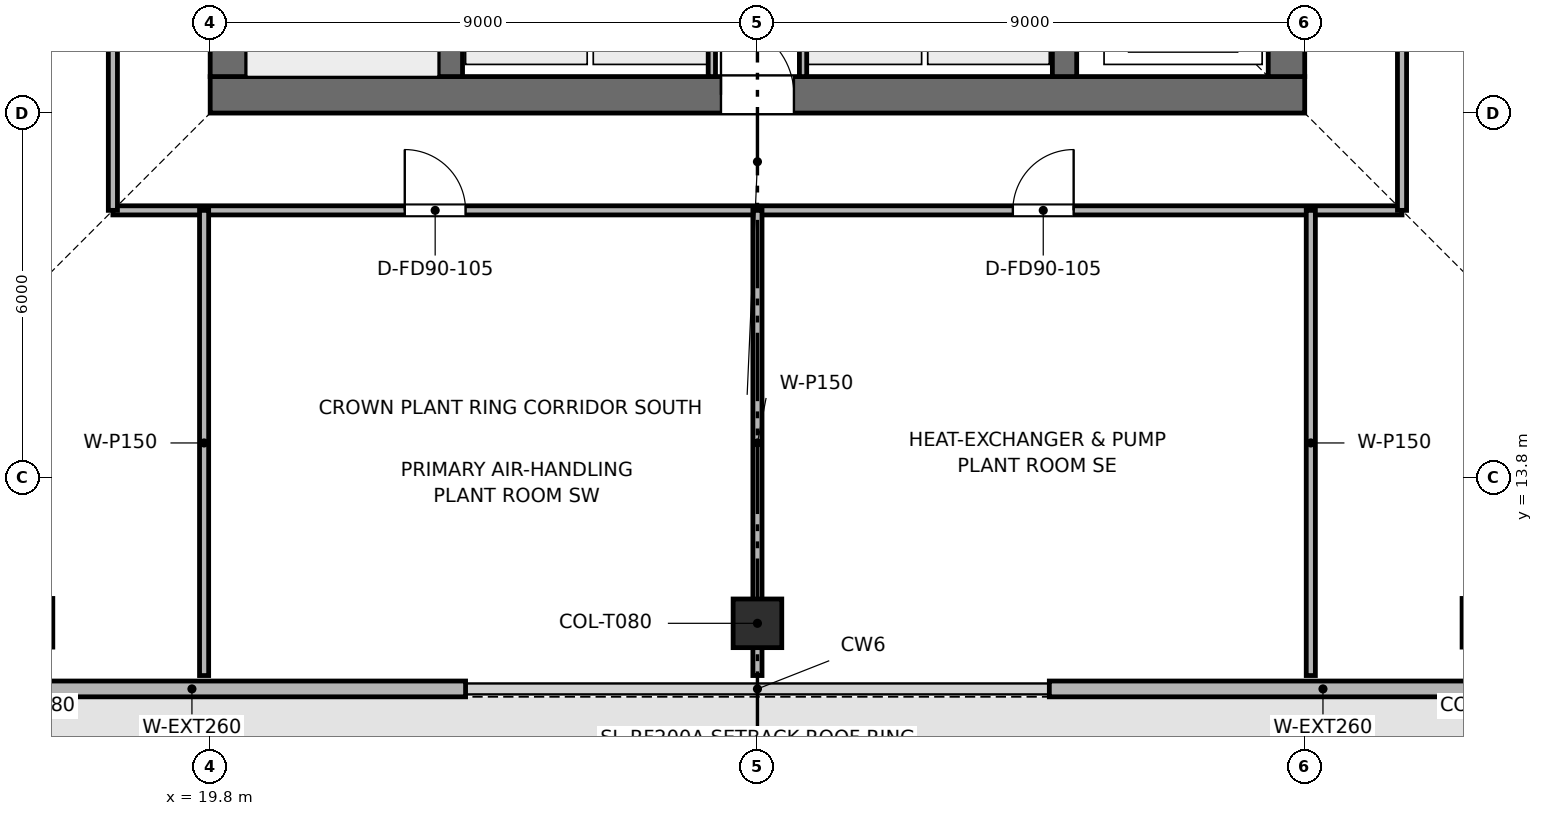
"""IFC4 building model, lengths in metres.
Left out: names, types, materials, properties, quantities, classifications, styles, units other than length and angle.
Written with IfcOpenShell. Run it as: python <this file> out.ifc"""

import sys

from ifc_helpers import new_model, si_unit, direction, frame, frame_2d, origin, origin_2d, place, context, subcontext, project, spatial, rectangle, extrude, element, fill, save


model = new_model("IFC4")
c1 = context("Model", 3, precision=1e-05, world=origin(), true_north=direction((0.0, 1.0)))
c2 = subcontext(c1, "Body", "Model", "MODEL_VIEW")
j1 = project(units=[si_unit("LENGTHUNIT", "METRE"), si_unit("PLANEANGLEUNIT", "RADIAN")], contexts=[c1])
p1 = place(None, origin())
s1 = spatial("IfcSite", under=j1, at=p1, CompositionType="ELEMENT")
p2 = place(p1, origin())
s2 = spatial("IfcBuilding", under=s1, at=p2, CompositionType="ELEMENT")
p3 = place(p2, frame((0.0, 0.0, 369.0)))
s3 = spatial("IfcBuildingStorey", under=s2, at=p3, CompositionType="ELEMENT", Elevation=369.0)
p4 = place(p3, frame((19.8, 20.1, 0.0), z_axis=(0.0, 0.0, 1.0), x_axis=(1.0, 0.0, 0.0)))
e1 = element("IfcWall", 1, at=p4, inside=s3, PredefinedType="SHEAR", context=c2, shape_type="SweptSolid", body=[
    extrude(rectangle(XDim=18.0, YDim=0.6, at=frame_2d((9.0, 0.0))), origin(), (0.0, 0.0, 1.0), 4.8),
])
p5 = place(p4, frame((8.4, 0.0, 0.0)))
e2 = element("IfcOpeningElement", 2, at=p5, cuts=e1, PredefinedType="OPENING", context=c2, shape_type="SweptSolid", body=[
    extrude(rectangle(XDim=1.2, YDim=2.2, at=frame_2d((0.6, 1.1))), frame((0.0, 0.31, 0.0), z_axis=(0.0, -1.0, 0.0), x_axis=(1.0, 0.0, 0.0)), (0.0, 0.0, 1.0), 0.62),
])
p6 = place(p3, frame((20.1, 20.4, 0.0), z_axis=(0.0, 0.0, 1.0), x_axis=(0.0, 1.0, 0.0)))
e3 = element("IfcWall", 3, at=p6, inside=s3, PredefinedType="SHEAR", context=c2, shape_type="SweptSolid", body=[
    extrude(rectangle(XDim=16.8, YDim=0.6, at=frame_2d((8.4, 0.0))), origin(), (0.0, 0.0, 1.0), 4.8),
])
p7 = place(p6, frame((10.4, 0.0, 0.0)))
e4 = element("IfcOpeningElement", 4, at=p7, cuts=e3, PredefinedType="OPENING", context=c2, shape_type="SweptSolid", body=[
    extrude(rectangle(XDim=1.1, YDim=2.15, at=frame_2d((0.55, 1.075))), frame((0.0, 0.31, 0.0), z_axis=(0.0, -1.0, 0.0), x_axis=(1.0, 0.0, 0.0)), (0.0, 0.0, 1.0), 0.62),
])
p8 = place(p3, frame((37.5, 20.4, 0.0), z_axis=(0.0, 0.0, 1.0), x_axis=(0.0, 1.0, 0.0)))
e5 = element("IfcWall", 5, at=p8, inside=s3, PredefinedType="SHEAR", context=c2, shape_type="SweptSolid", body=[
    extrude(rectangle(XDim=16.8, YDim=0.6, at=frame_2d((8.4, 0.0))), origin(), (0.0, 0.0, 1.0), 4.8),
])
p9 = place(p8, frame((4.9, 0.0, 0.0)))
e6 = element("IfcOpeningElement", 6, at=p9, cuts=e5, PredefinedType="OPENING", context=c2, shape_type="SweptSolid", body=[
    extrude(rectangle(XDim=1.1, YDim=2.15, at=frame_2d((0.55, 1.075))), frame((0.0, 0.31, 0.0), z_axis=(0.0, -1.0, 0.0), x_axis=(1.0, 0.0, 0.0)), (0.0, 0.0, 1.0), 0.62),
])
for number, where, z_axis, x_axis in (
    (7, (23.75, 20.4, 0.0), (0.0, 0.0, 1.0), (0.0, 1.0, 0.0)),
    (8, (33.85, 20.4, 0.0), (0.0, 0.0, 1.0), (0.0, 1.0, 0.0)),
):
    element("IfcWall", number, at=place(p3, frame(where, z_axis=z_axis, x_axis=x_axis)), inside=s3, PredefinedType="SHEAR", context=c2, shape_type="SweptSolid", body=[
        extrude(rectangle(XDim=16.8, YDim=0.4, at=frame_2d((8.4, 0.0))), origin(), (0.0, 0.0, 1.0), 4.8),
    ])
p10 = place(p3, frame((16.812, 11.418, 0.049), z_axis=(0.227948550451, 0.341973056736, 0.911643508623), x_axis=(-0.832087899219, 0.554643784761, 0.0)))
e9 = element("IfcColumn", 9, at=p10, inside=s3, PredefinedType="COLUMN", context=c2, shape_type="SweptSolid", body=[
    extrude(rectangle(XDim=0.8, YDim=0.8, at=origin_2d()), origin(), (0.0, 0.0, 1.0), 4.86),
])
p11 = place(p3, frame((28.8, 11.409, 0.025), z_axis=(0.0, 0.35111223817, 0.936333378774), x_axis=(-1.0, 0.0, 0.0)))
e10 = element("IfcColumn", 10, at=p11, inside=s3, PredefinedType="COLUMN", context=c2, shape_type="SweptSolid", body=[
    extrude(rectangle(XDim=0.8, YDim=0.8, at=origin_2d()), origin(), (0.0, 0.0, 1.0), 4.776),
])
p12 = place(p3, frame((40.788, 11.418, 0.049), z_axis=(-0.22799617066, 0.341969140747, 0.911633069245), x_axis=(-0.832031491738, -0.554728399089, 0.0)))
e11 = element("IfcColumn", 11, at=p12, inside=s3, PredefinedType="COLUMN", context=c2, shape_type="SweptSolid", body=[
    extrude(rectangle(XDim=0.8, YDim=0.8, at=origin_2d()), origin(), (0.0, 0.0, 1.0), 4.86),
])
for number, where, z_axis, x_axis in (
    (12, (16.354, 16.354, 0.018), (0.236, 0.236, 0.943), (-0.707, 0.707, 0.0)),
    (13, (41.246, 16.354, 0.018), (-0.236, 0.236, 0.943), (-0.707, -0.707, 0.0)),
):
    element("IfcColumn", number, at=place(p3, frame(where, z_axis=z_axis, x_axis=x_axis)), inside=s3, PredefinedType="COLUMN", context=c2, shape_type="SweptSolid", body=[
        extrude(rectangle(XDim=0.8, YDim=0.8, at=origin_2d()), origin(), (0.0, 0.0, 1.0), 4.751),
    ])
for number, where, z_axis, x_axis in (
    (14, (42.6, 10.33, 0.0), (0.0, 0.0, 1.0), (-1.0, 0.0, 0.0)),
    (15, (24.0, 10.33, 0.0), (0.0, 0.0, 1.0), (-1.0, 0.0, 0.0)),
):
    element("IfcWall", number, at=place(p3, frame(where, z_axis=z_axis, x_axis=x_axis)), inside=s3, PredefinedType="SOLIDWALL", context=c2, shape_type="SweptSolid", body=[
        extrude(rectangle(XDim=9.0, YDim=0.26, at=frame_2d((4.5, 0.0))), origin(), (0.0, 0.0, 1.0), 4.5),
    ])
for number, where, z_axis, x_axis in (
    (16, (28.05, 20.4, 0.0), (0.0, 0.0, 1.0), (0.0, 1.0, 0.0)),
    (17, (29.55, 20.4, 0.0), (0.0, 0.0, 1.0), (0.0, 1.0, 0.0)),
):
    element("IfcWall", number, at=place(p3, frame(where, z_axis=z_axis, x_axis=x_axis)), inside=s3, PredefinedType="PARTITIONING", context=c2, shape_type="SweptSolid", body=[
        extrude(rectangle(XDim=2.75, YDim=0.12, at=frame_2d((1.375, 0.0))), origin(), (0.0, 0.0, 1.0), 4.5),
    ])
p13 = place(p3, frame((18.2, 18.2, 0.0), z_axis=(0.0, 0.0, 1.0), x_axis=(1.0, 0.0, 0.0)))
e18 = element("IfcWall", 18, at=p13, inside=s3, PredefinedType="PARTITIONING", context=c2, shape_type="SweptSolid", body=[
    extrude(rectangle(XDim=21.2, YDim=0.15, at=frame_2d((10.6, 0.0))), origin(), (0.0, 0.0, 1.0), 4.085),
])
p14 = place(p13, frame((4.8, 0.0, 0.0)))
e19 = element("IfcOpeningElement", 19, at=p14, cuts=e18, PredefinedType="OPENING", context=c2, shape_type="SweptSolid", body=[
    extrude(rectangle(XDim=1.0, YDim=2.15, at=frame_2d((0.5, 1.075))), frame((0.0, 0.085, 0.0), z_axis=(0.0, -1.0, 0.0), x_axis=(1.0, 0.0, 0.0)), (0.0, 0.0, 1.0), 0.17),
])
p15 = place(p13, frame((14.8, 0.0, 0.0)))
e20 = element("IfcOpeningElement", 20, at=p15, cuts=e18, PredefinedType="OPENING", context=c2, shape_type="SweptSolid", body=[
    extrude(rectangle(XDim=1.0, YDim=2.15, at=frame_2d((0.5, 1.075))), frame((0.0, 0.085, 0.0), z_axis=(0.0, -1.0, 0.0), x_axis=(1.0, 0.0, 0.0)), (0.0, 0.0, 1.0), 0.17),
])
for number, where, z_axis, x_axis in (
    (21, (18.2, 18.2, 0.0), (0.0, 0.0, 1.0), (0.0, 1.0, 0.0)),
    (22, (39.4, 18.2, 0.0), (0.0, 0.0, 1.0), (0.0, 1.0, 0.0)),
):
    element("IfcWall", number, at=place(p3, frame(where, z_axis=z_axis, x_axis=x_axis)), inside=s3, PredefinedType="PARTITIONING", context=c2, shape_type="SweptSolid", body=[
        extrude(rectangle(XDim=21.2, YDim=0.15, at=frame_2d((10.6, 0.0))), origin(), (0.0, 0.0, 1.0), 4.085),
    ])
p16 = place(p3, frame((19.7, 10.55, 0.0), z_axis=(0.0, 0.0, 1.0), x_axis=(0.0, 1.0, 0.0)))
e23 = element("IfcWall", 23, at=p16, inside=s3, PredefinedType="PARTITIONING", context=c2, shape_type="SweptSolid", body=[
    extrude(rectangle(XDim=7.65, YDim=0.15, at=frame_2d((3.825, 0.0))), origin(), (0.0, 0.0, 1.0), 4.185),
])
p17 = place(p3, frame((28.8, 10.55, 0.0), z_axis=(0.0, 0.0, 1.0), x_axis=(0.0, 1.0, 0.0)))
e24 = element("IfcWall", 24, at=p17, inside=s3, PredefinedType="PARTITIONING", context=c2, shape_type="SweptSolid", body=[
    extrude(rectangle(XDim=7.65, YDim=0.15, at=frame_2d((3.825, 0.0))), origin(), (0.0, 0.0, 1.0), 4.085),
])
p18 = place(p3, frame((37.9, 10.55, 0.0), z_axis=(0.0, 0.0, 1.0), x_axis=(0.0, 1.0, 0.0)))
e25 = element("IfcWall", 25, at=p18, inside=s3, PredefinedType="PARTITIONING", context=c2, shape_type="SweptSolid", body=[
    extrude(rectangle(XDim=7.65, YDim=0.15, at=frame_2d((3.825, 0.0))), origin(), (0.0, 0.0, 1.0), 4.185),
])
p19 = place(p14, origin())
e26 = element("IfcDoor", 26, at=p19, inside=s3, OperationType="SINGLE_SWING_LEFT", PredefinedType="DOOR", context=c2, shape_type="SweptSolid", body=[
    extrude(rectangle(XDim=1.0, YDim=2.15, at=frame_2d((0.5, 1.075))), frame((0.0, 0.025, 0.0), z_axis=(0.0, -1.0, 0.0), x_axis=(1.0, 0.0, 0.0)), (0.0, 0.0, 1.0), 0.05),
])
fill(e19, e26)
p20 = place(p15, origin())
e27 = element("IfcDoor", 27, at=p20, inside=s3, OperationType="SINGLE_SWING_RIGHT", PredefinedType="DOOR", context=c2, shape_type="SweptSolid", body=[
    extrude(rectangle(XDim=1.0, YDim=2.15, at=frame_2d((0.5, 1.075))), frame((0.0, 0.025, 0.0), z_axis=(0.0, -1.0, 0.0), x_axis=(1.0, 0.0, 0.0)), (0.0, 0.0, 1.0), 0.05),
])
fill(e20, e27)
p21 = place(p5, origin())
e28 = element("IfcDoor", 28, at=p21, inside=s3, OperationType="SINGLE_SWING_LEFT", PredefinedType="DOOR", context=c2, shape_type="SweptSolid", body=[
    extrude(rectangle(XDim=1.2, YDim=2.2, at=frame_2d((0.6, 1.1))), frame((0.0, 0.025, 0.0), z_axis=(0.0, -1.0, 0.0), x_axis=(1.0, 0.0, 0.0)), (0.0, 0.0, 1.0), 0.05),
])
fill(e2, e28)
save(model, sys.argv[1])
